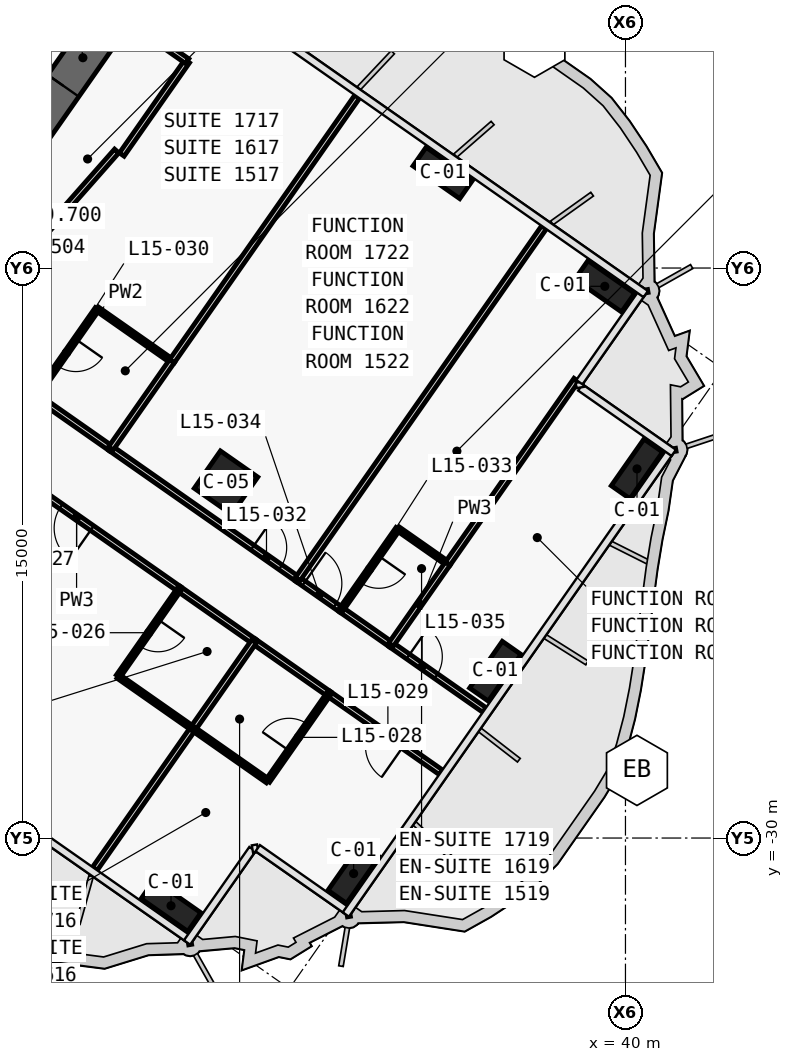
"""IFC4 building model, lengths in metres.
Left out: names, types, materials, properties, quantities, classifications, styles, units other than length and angle.
Written with IfcOpenShell. Run it as: python <this file> out.ifc"""

import sys

from ifc_helpers import new_model, si_unit, direction, frame, frame_2d, origin, origin_2d, place, context, subcontext, project, spatial, polyline, rectangle, outline, extrude, element, fill, save


model = new_model("IFC4")
c1 = context("Model", 3, precision=1e-05, world=origin(), true_north=direction((0.0, 1.0)))
c2 = subcontext(c1, "Body", "Model", "MODEL_VIEW")
j1 = project(units=[si_unit("LENGTHUNIT", "METRE"), si_unit("PLANEANGLEUNIT", "RADIAN")], contexts=[c1])
p1 = place(None, origin())
s1 = spatial("IfcSite", under=j1, at=p1, CompositionType="ELEMENT")
p2 = place(p1, origin())
s2 = spatial("IfcBuilding", under=s1, at=p2, CompositionType="ELEMENT")
p3 = place(p2, frame((0.0, 0.0, 79.7)))
s3 = spatial("IfcBuildingStorey", under=s2, at=p3, CompositionType="ELEMENT", Elevation=79.7)
p4 = place(p3, frame((21.708, -15.2, 0.0), z_axis=(0.0, 0.0, 1.0), x_axis=(0.573576324356, 0.819152122709, 0.0)))
e1 = element("IfcWall", 1, at=p4, inside=s3, PredefinedType="SHEAR", context=c2, shape_type="SweptSolid", body=[
    extrude(outline(polyline([(9.2, 0.5), (0.0, 0.5), (0.0, -0.5), (9.2, -0.5), (9.2, 0.5)])), origin(), (0.0, 0.0, 1.0), 3.6),
])
p5 = place(p4, frame((6.1, 0.0, 0.0)))
e2 = element("IfcOpeningElement", 2, at=p5, cuts=e1, PredefinedType="OPENING", context=c2, shape_type="SweptSolid", body=[
    extrude(rectangle(XDim=1.8, YDim=2.1, at=frame_2d((0.9, 1.05))), frame((0.0, 0.51, 0.0), z_axis=(0.0, -1.0, 0.0), x_axis=(1.0, 0.0, 0.0)), (0.0, 0.0, 1.0), 1.02),
])
p6 = place(p4, frame((1.9, 0.0, 0.0)))
e3 = element("IfcOpeningElement", 3, at=p6, cuts=e1, PredefinedType="OPENING", context=c2, shape_type="SweptSolid", body=[
    extrude(rectangle(XDim=1.8, YDim=2.1, at=frame_2d((0.9, 1.05))), frame((0.0, 0.51, 0.0), z_axis=(0.0, -1.0, 0.0), x_axis=(1.0, 0.0, 0.0)), (0.0, 0.0, 1.0), 1.02),
])
for number, where, z_axis, x_axis in (
    (4, (28.042, -31.782, 0.0), (0.0, 0.0, 1.0), (0.819, -0.574, 0.0)),
    (5, (35.197, -12.498, 0.0), (0.0, 0.0, 1.0), (0.819, -0.574, 0.0)),
    (6, (39.456, -15.481, 0.0), (0.0, 0.0, 1.0), (0.819, -0.574, 0.0)),
    (7, (32.847, -30.935, 0.0), (0.0, 0.0, 1.0), (0.574, 0.819, 0.0)),
    (8, (36.575, -25.61, 0.0), (0.0, 0.0, 1.0), (0.574, 0.819, 0.0)),
    (9, (40.303, -20.286, 0.0), (0.0, 0.0, 1.0), (0.574, 0.819, 0.0)),
):
    element("IfcColumn", number, at=place(p3, frame(where, z_axis=z_axis, x_axis=x_axis)), inside=s3, PredefinedType="COLUMN", context=c2, shape_type="SweptSolid", body=[
        extrude(rectangle(XDim=1.5, YDim=0.6, at=origin_2d()), origin(), (0.0, 0.0, 1.0), 3.6),
    ])
p7 = place(p3, frame((29.49, -20.649, 0.0), z_axis=(0.0, 0.0, 1.0), x_axis=(0.819152044289, -0.573576436351, 0.0)))
e10 = element("IfcColumn", 10, at=p7, inside=s3, PredefinedType="COLUMN", context=c2, shape_type="SweptSolid", body=[
    extrude(rectangle(XDim=1.2, YDim=1.2, at=origin_2d()), origin(), (0.0, 0.0, 1.0), 3.6),
])
p8 = place(p3, frame((24.491, -18.369, 0.0), z_axis=(0.0, 0.0, 1.0), x_axis=(0.819179439794, -0.573537309527, 0.0)))
e11 = element("IfcWall", 11, at=p8, inside=s3, PredefinedType="PARTITIONING", context=c2, shape_type="SweptSolid", body=[
    extrude(rectangle(XDim=2.404, YDim=0.15, at=frame_2d((1.202, 0.0))), origin(), (0.0, 0.0, 1.0), 3.32),
])
p9 = place(p3, frame((26.457, -19.746, 0.0), z_axis=(0.0, 0.0, 1.0), x_axis=(0.819165052243, -0.573557858619, 0.0)))
e12 = element("IfcWall", 12, at=p9, inside=s3, PredefinedType="PARTITIONING", context=c2, shape_type="SweptSolid", body=[
    extrude(rectangle(XDim=6.004, YDim=0.15, at=frame_2d((3.002, 0.0))), origin(), (0.0, 0.0, 1.0), 2.6),
])
p10 = place(p9, frame((4.552, 0.0, 0.0)))
e13 = element("IfcOpeningElement", 13, at=p10, cuts=e12, PredefinedType="OPENING", context=c2, shape_type="SweptSolid", body=[
    extrude(rectangle(XDim=0.9, YDim=2.1, at=frame_2d((0.45, 1.05))), frame((0.0, 0.085, 0.0), z_axis=(0.0, -1.0, 0.0), x_axis=(1.0, 0.0, 0.0)), (0.0, 0.0, 1.0), 0.17),
])
p11 = place(p3, frame((31.372, -23.188, 0.0), z_axis=(0.0, 0.0, 1.0), x_axis=(0.819199220913, -0.573509055252, 0.0)))
e14 = element("IfcWall", 14, at=p11, inside=s3, PredefinedType="PARTITIONING", context=c2, shape_type="SweptSolid", body=[
    extrude(rectangle(XDim=1.403, YDim=0.15, at=frame_2d((0.702, 0.0))), origin(), (0.0, 0.0, 1.0), 3.32),
])
p12 = place(p11, frame((0.202, 0.0, 0.0)))
e15 = element("IfcOpeningElement", 15, at=p12, cuts=e14, PredefinedType="OPENING", context=c2, shape_type="SweptSolid", body=[
    extrude(rectangle(XDim=1.0, YDim=2.1, at=frame_2d((0.5, 1.05))), frame((0.0, 0.085, 0.0), z_axis=(0.0, -1.0, 0.0), x_axis=(1.0, 0.0, 0.0)), (0.0, 0.0, 1.0), 0.17),
])
p13 = place(p3, frame((32.519, -23.99, 0.0), z_axis=(0.0, 0.0, 1.0), x_axis=(0.819189013667, -0.573523634986, 0.0)))
e16 = element("IfcWall", 16, at=p13, inside=s3, PredefinedType="PARTITIONING", context=c2, shape_type="SweptSolid", body=[
    extrude(rectangle(XDim=1.604, YDim=0.15, at=frame_2d((0.802, 0.0))), origin(), (0.0, 0.0, 1.0), 3.32),
])
p14 = place(p3, frame((33.829, -24.908, 0.0), z_axis=(0.0, 0.0, 1.0), x_axis=(0.81915932427, -0.57356603932, 0.0)))
e17 = element("IfcWall", 17, at=p14, inside=s3, PredefinedType="PARTITIONING", context=c2, shape_type="SweptSolid", body=[
    extrude(rectangle(XDim=3.002, YDim=0.15, at=frame_2d((1.501, 0.0))), origin(), (0.0, 0.0, 1.0), 2.5),
])
p15 = place(p14, frame((0.551, 0.0, 0.0)))
e18 = element("IfcOpeningElement", 18, at=p15, cuts=e17, PredefinedType="OPENING", context=c2, shape_type="SweptSolid", body=[
    extrude(rectangle(XDim=0.9, YDim=2.1, at=frame_2d((0.45, 1.05))), frame((0.0, 0.085, 0.0), z_axis=(0.0, -1.0, 0.0), x_axis=(1.0, 0.0, 0.0)), (0.0, 0.0, 1.0), 0.17),
])
p16 = place(p3, frame((28.261, -23.451, 0.0), z_axis=(0.0, 0.0, 1.0), x_axis=(-0.819141582452, 0.573591377113, 0.0)))
e19 = element("IfcWall", 19, at=p16, inside=s3, PredefinedType="PARTITIONING", context=c2, shape_type="SweptSolid", body=[
    extrude(rectangle(XDim=6.603, YDim=0.15, at=frame_2d((3.301, 0.0))), origin(), (0.0, 0.0, 1.0), 2.6),
])
p17 = place(p16, frame((2.801, 0.0, 0.0)))
e20 = element("IfcOpeningElement", 20, at=p17, cuts=e19, PredefinedType="OPENING", context=c2, shape_type="SweptSolid", body=[
    extrude(rectangle(XDim=1.0, YDim=2.1, at=frame_2d((0.5, 1.05))), frame((0.0, 0.085, 0.0), z_axis=(0.0, -1.0, 0.0), x_axis=(1.0, 0.0, 0.0)), (0.0, 0.0, 1.0), 0.17),
])
p18 = place(p3, frame((30.228, -24.828, 0.0), z_axis=(0.0, 0.0, 1.0), x_axis=(-0.819146032251, 0.573585022335, 0.0)))
e21 = element("IfcWall", 21, at=p18, inside=s3, PredefinedType="PARTITIONING", context=c2, shape_type="SweptSolid", body=[
    extrude(rectangle(XDim=2.404, YDim=0.15, at=frame_2d((1.202, 0.0))), origin(), (0.0, 0.0, 1.0), 3.32),
])
p19 = place(p3, frame((35.141, -28.268, 0.0), z_axis=(0.0, 0.0, 1.0), x_axis=(-0.819149096931, 0.573580645591, 0.0)))
e22 = element("IfcWall", 22, at=p19, inside=s3, PredefinedType="PARTITIONING", context=c2, shape_type="SweptSolid", body=[
    extrude(rectangle(XDim=3.601, YDim=0.15, at=frame_2d((1.8, 0.0))), origin(), (0.0, 0.0, 1.0), 2.5),
])
p20 = place(p19, frame((1.2, 0.0, 0.0)))
e23 = element("IfcOpeningElement", 23, at=p20, cuts=e22, PredefinedType="OPENING", context=c2, shape_type="SweptSolid", body=[
    extrude(rectangle(XDim=1.0, YDim=2.1, at=frame_2d((0.5, 1.05))), frame((0.0, 0.085, 0.0), z_axis=(0.0, -1.0, 0.0), x_axis=(1.0, 0.0, 0.0)), (0.0, 0.0, 1.0), 0.17),
])
p21 = place(p3, frame((32.194, -26.205, 0.0), z_axis=(0.0, 0.0, 1.0), x_axis=(-0.819146032251, 0.573585022335, 0.0)))
e24 = element("IfcWall", 24, at=p21, inside=s3, PredefinedType="PARTITIONING", context=c2, shape_type="SweptSolid", body=[
    extrude(rectangle(XDim=2.404, YDim=0.15, at=frame_2d((1.202, 0.0))), origin(), (0.0, 0.0, 1.0), 3.32),
])
p22 = place(p3, frame((26.098, -16.076, 0.0), z_axis=(0.0, 0.0, 1.0), x_axis=(-0.573550118428, -0.819170471667, 0.0)))
e25 = element("IfcWall", 25, at=p22, inside=s3, PredefinedType="PARTITIONING", context=c2, shape_type="SweptSolid", body=[
    extrude(rectangle(XDim=2.8, YDim=0.12, at=frame_2d((1.4, 0.0))), origin(), (0.0, 0.0, 1.0), 2.6),
])
p23 = place(p22, frame((0.975, 0.0, 0.0)))
e26 = element("IfcOpeningElement", 26, at=p23, cuts=e25, PredefinedType="OPENING", context=c2, shape_type="SweptSolid", body=[
    extrude(rectangle(XDim=0.85, YDim=2.05, at=frame_2d((0.425, 1.025))), frame((0.0, 0.07, 0.0), z_axis=(0.0, -1.0, 0.0), x_axis=(1.0, 0.0, 0.0)), (0.0, 0.0, 1.0), 0.14),
])
p24 = place(p3, frame((28.065, -17.453, 0.0), z_axis=(0.0, 0.0, 1.0), x_axis=(-0.819155442668, 0.573571582932, 0.0)))
e27 = element("IfcWall", 27, at=p24, inside=s3, PredefinedType="PARTITIONING", context=c2, shape_type="SweptSolid", body=[
    extrude(rectangle(XDim=2.4, YDim=0.12, at=frame_2d((1.2, 0.0))), origin(), (0.0, 0.0, 1.0), 3.32),
])
p25 = place(p3, frame((32.94, -10.491, 0.0), z_axis=(0.0, 0.0, 1.0), x_axis=(-0.573593433868, -0.819140142237, 0.0)))
e28 = element("IfcWall", 28, at=p25, inside=s3, PredefinedType="PARTITIONING", context=c2, shape_type="SweptSolid", body=[
    extrude(rectangle(XDim=8.499, YDim=0.15, at=frame_2d((4.25, 0.0))), origin(), (0.0, 0.0, 1.0), 2.6),
])
p26 = place(p3, frame((22.285, -16.825, 0.0), z_axis=(0.0, 0.0, 1.0), x_axis=(0.661551268245, 0.749899939647, 0.0)))
e29 = element("IfcWall", 29, at=p26, inside=s3, PredefinedType="PARTITIONING", context=c2, shape_type="SweptSolid", body=[
    extrude(rectangle(XDim=6.541, YDim=0.15, at=frame_2d((3.271, 0.0))), origin(), (0.0, 0.0, 1.0), 2.6),
])
p27 = place(p3, frame((26.746, -12.014, 0.0), z_axis=(0.0, 0.0, 1.0), x_axis=(0.573560650686, 0.819163097304, 0.0)))
e30 = element("IfcWall", 30, at=p27, inside=s3, PredefinedType="PARTITIONING", context=c2, shape_type="SweptSolid", body=[
    extrude(rectangle(XDim=3.0, YDim=0.15, at=frame_2d((1.5, 0.0))), origin(), (0.0, 0.0, 1.0), 3.32),
])
p28 = place(p3, frame((28.467, -9.556, 0.0), z_axis=(0.0, 0.0, 1.0), x_axis=(-0.819109000826, 0.573637903879, 0.0)))
e31 = element("IfcWall", 31, at=p28, inside=s3, PredefinedType="PARTITIONING", context=c2, shape_type="SweptSolid", body=[
    extrude(rectangle(XDim=1.68, YDim=0.15, at=frame_2d((0.84, 0.0))), origin(), (0.0, 0.0, 1.0), 3.32),
])
p29 = place(p3, frame((28.064, -17.454, 0.0), z_axis=(0.0, 0.0, 1.0), x_axis=(-0.573550118428, -0.819170471667, 0.0)))
e32 = element("IfcWall", 32, at=p29, inside=s3, PredefinedType="PARTITIONING", context=c2, shape_type="SweptSolid", body=[
    extrude(rectangle(XDim=2.8, YDim=0.15, at=frame_2d((1.4, 0.0))), origin(), (0.0, 0.0, 1.0), 2.6),
])
p30 = place(p3, frame((37.855, -13.932, 0.0), z_axis=(0.0, 0.0, 1.0), x_axis=(-0.573571089604, -0.819155788095, 0.0)))
e33 = element("IfcWall", 33, at=p30, inside=s3, PredefinedType="PARTITIONING", context=c2, shape_type="SweptSolid", body=[
    extrude(rectangle(XDim=11.3, YDim=0.15, at=frame_2d((5.65, 0.0))), origin(), (0.0, 0.0, 1.0), 2.5),
])
p31 = place(p3, frame((35.323, -22.779, 0.0), z_axis=(0.0, 0.0, 1.0), x_axis=(-0.81918174131, 0.573534022273, 0.0)))
e34 = element("IfcWall", 34, at=p31, inside=s3, PredefinedType="PARTITIONING", context=c2, shape_type="SweptSolid", body=[
    extrude(rectangle(XDim=1.6, YDim=0.12, at=frame_2d((0.8, 0.0))), origin(), (0.0, 0.0, 1.0), 3.32),
])
p32 = place(p3, frame((34.01, -21.861, 0.0), z_axis=(0.0, 0.0, 1.0), x_axis=(-0.573537965655, -0.819178980414, 0.0)))
e35 = element("IfcWall", 35, at=p32, inside=s3, PredefinedType="PARTITIONING", context=c2, shape_type="SweptSolid", body=[
    extrude(rectangle(XDim=2.6, YDim=0.12, at=frame_2d((1.3, 0.0))), origin(), (0.0, 0.0, 1.0), 2.6),
])
p33 = place(p32, frame((0.875, 0.0, 0.0)))
e36 = element("IfcOpeningElement", 36, at=p33, cuts=e35, PredefinedType="OPENING", context=c2, shape_type="SweptSolid", body=[
    extrude(rectangle(XDim=0.85, YDim=2.05, at=frame_2d((0.425, 1.025))), frame((0.0, 0.07, 0.0), z_axis=(0.0, -1.0, 0.0), x_axis=(1.0, 0.0, 0.0)), (0.0, 0.0, 1.0), 0.14),
])
p34 = place(p3, frame((38.708, -17.945, 0.0), z_axis=(0.0, 0.0, 1.0), x_axis=(-0.573573403315, -0.819154168035, 0.0)))
e37 = element("IfcWall", 37, at=p34, inside=s3, PredefinedType="PARTITIONING", context=c2, shape_type="SweptSolid", body=[
    extrude(rectangle(XDim=5.901, YDim=0.15, at=frame_2d((2.951, 0.0))), origin(), (0.0, 0.0, 1.0), 3.32),
])
p35 = place(p3, frame((35.322, -22.78, 0.0), z_axis=(0.0, 0.0, 1.0), x_axis=(-0.573537965655, -0.819178980414, 0.0)))
e38 = element("IfcWall", 38, at=p35, inside=s3, PredefinedType="PARTITIONING", context=c2, shape_type="SweptSolid", body=[
    extrude(rectangle(XDim=2.6, YDim=0.15, at=frame_2d((1.3, 0.0))), origin(), (0.0, 0.0, 1.0), 2.6),
])
p36 = place(p3, frame((28.26, -23.45, 0.0), z_axis=(0.0, 0.0, 1.0), x_axis=(-0.573608623498, -0.819129505664, 0.0)))
e39 = element("IfcWall", 39, at=p36, inside=s3, PredefinedType="PARTITIONING", context=c2, shape_type="SweptSolid", body=[
    extrude(rectangle(XDim=2.8, YDim=0.12, at=frame_2d((1.4, 0.0))), origin(), (0.0, 0.0, 1.0), 3.32),
])
p37 = place(p36, frame((0.975, 0.0, 0.0)))
e40 = element("IfcOpeningElement", 40, at=p37, cuts=e39, PredefinedType="OPENING", context=c2, shape_type="SweptSolid", body=[
    extrude(rectangle(XDim=0.85, YDim=2.05, at=frame_2d((0.425, 1.025))), frame((0.0, 0.07, 0.0), z_axis=(0.0, -1.0, 0.0), x_axis=(1.0, 0.0, 0.0)), (0.0, 0.0, 1.0), 0.14),
])
p38 = place(p3, frame((26.654, -25.745, 0.0), z_axis=(0.0, 0.0, 1.0), x_axis=(0.819188907105, -0.573523787192, 0.0)))
e41 = element("IfcWall", 41, at=p38, inside=s3, PredefinedType="PARTITIONING", context=c2, shape_type="SweptSolid", body=[
    extrude(rectangle(XDim=2.4, YDim=0.12, at=frame_2d((1.2, 0.0))), origin(), (0.0, 0.0, 1.0), 3.32),
])
p39 = place(p3, frame((28.62, -27.121, 0.0), z_axis=(0.0, 0.0, 1.0), x_axis=(-0.573589807488, -0.819142681555, 0.0)))
e42 = element("IfcWall", 42, at=p39, inside=s3, PredefinedType="PARTITIONING", context=c2, shape_type="SweptSolid", body=[
    extrude(rectangle(XDim=4.499, YDim=0.15, at=frame_2d((2.25, 0.0))), origin(), (0.0, 0.0, 1.0), 2.5),
])
p40 = place(p3, frame((30.226, -24.827, 0.0), z_axis=(0.0, 0.0, 1.0), x_axis=(-0.573608623498, -0.819129505664, 0.0)))
e43 = element("IfcWall", 43, at=p40, inside=s3, PredefinedType="PARTITIONING", context=c2, shape_type="SweptSolid", body=[
    extrude(rectangle(XDim=2.8, YDim=0.15, at=frame_2d((1.4, 0.0))), origin(), (0.0, 0.0, 1.0), 3.32),
])
p41 = place(p3, frame((28.62, -27.121, 0.0), z_axis=(0.0, 0.0, 1.0), x_axis=(0.819141114317, -0.573592045652, 0.0)))
e44 = element("IfcWall", 44, at=p41, inside=s3, PredefinedType="PARTITIONING", context=c2, shape_type="SweptSolid", body=[
    extrude(rectangle(XDim=2.4, YDim=0.12, at=frame_2d((1.2, 0.0))), origin(), (0.0, 0.0, 1.0), 3.32),
])
p42 = place(p3, frame((30.587, -28.498, 0.0), z_axis=(0.0, 0.0, 1.0), x_axis=(0.573608623498, 0.819129505664, 0.0)))
e45 = element("IfcWall", 45, at=p42, inside=s3, PredefinedType="PARTITIONING", context=c2, shape_type="SweptSolid", body=[
    extrude(rectangle(XDim=2.8, YDim=0.12, at=frame_2d((1.4, 0.0))), origin(), (0.0, 0.0, 1.0), 3.32),
])
p43 = place(p42, frame((0.975, 0.0, 0.0)))
e46 = element("IfcOpeningElement", 46, at=p43, cuts=e45, PredefinedType="OPENING", context=c2, shape_type="SweptSolid", body=[
    extrude(rectangle(XDim=0.85, YDim=2.05, at=frame_2d((0.425, 1.025))), frame((0.0, 0.07, 0.0), z_axis=(0.0, -1.0, 0.0), x_axis=(1.0, 0.0, 0.0)), (0.0, 0.0, 1.0), 0.14),
])
p44 = place(p5, origin())
e47 = element("IfcDoor", 47, at=p44, inside=s3, OperationType="DOUBLE_DOOR_SINGLE_SWING", PredefinedType="DOOR", context=c2, shape_type="SweptSolid", body=[
    extrude(rectangle(XDim=1.8, YDim=2.1, at=frame_2d((0.9, 1.05))), frame((0.0, 0.025, 0.0), z_axis=(0.0, -1.0, 0.0), x_axis=(1.0, 0.0, 0.0)), (0.0, 0.0, 1.0), 0.05),
])
fill(e2, e47)
p45 = place(p37, origin())
e48 = element("IfcDoor", 48, at=p45, inside=s3, OperationType="SINGLE_SWING_RIGHT", PredefinedType="DOOR", context=c2, shape_type="SweptSolid", body=[
    extrude(rectangle(XDim=0.85, YDim=2.05, at=frame_2d((0.425, 1.025))), frame((0.0, 0.025, 0.0), z_axis=(0.0, -1.0, 0.0), x_axis=(1.0, 0.0, 0.0)), (0.0, 0.0, 1.0), 0.05),
])
fill(e40, e48)
p46 = place(p17, origin())
e49 = element("IfcDoor", 49, at=p46, inside=s3, OperationType="SINGLE_SWING_RIGHT", PredefinedType="DOOR", context=c2, shape_type="SweptSolid", body=[
    extrude(rectangle(XDim=1.0, YDim=2.1, at=frame_2d((0.5, 1.05))), frame((0.0, 0.025, 0.0), z_axis=(0.0, -1.0, 0.0), x_axis=(1.0, 0.0, 0.0)), (0.0, 0.0, 1.0), 0.05),
])
fill(e20, e49)
p47 = place(p43, origin())
e50 = element("IfcDoor", 50, at=p47, inside=s3, OperationType="SINGLE_SWING_RIGHT", PredefinedType="DOOR", context=c2, shape_type="SweptSolid", body=[
    extrude(rectangle(XDim=0.85, YDim=2.05, at=frame_2d((0.425, 1.025))), frame((0.0, 0.025, 0.0), z_axis=(0.0, -1.0, 0.0), x_axis=(1.0, 0.0, 0.0)), (0.0, 0.0, 1.0), 0.05),
])
fill(e46, e50)
p48 = place(p20, origin())
e51 = element("IfcDoor", 51, at=p48, inside=s3, OperationType="SINGLE_SWING_RIGHT", PredefinedType="DOOR", context=c2, shape_type="SweptSolid", body=[
    extrude(rectangle(XDim=1.0, YDim=2.1, at=frame_2d((0.5, 1.05))), frame((0.0, 0.025, 0.0), z_axis=(0.0, -1.0, 0.0), x_axis=(1.0, 0.0, 0.0)), (0.0, 0.0, 1.0), 0.05),
])
fill(e23, e51)
p49 = place(p23, origin())
e52 = element("IfcDoor", 52, at=p49, inside=s3, OperationType="SINGLE_SWING_RIGHT", PredefinedType="DOOR", context=c2, shape_type="SweptSolid", body=[
    extrude(rectangle(XDim=0.85, YDim=2.05, at=frame_2d((0.425, 1.025))), frame((0.0, 0.025, 0.0), z_axis=(0.0, -1.0, 0.0), x_axis=(1.0, 0.0, 0.0)), (0.0, 0.0, 1.0), 0.05),
])
fill(e26, e52)
p50 = place(p10, origin())
e53 = element("IfcDoor", 53, at=p50, inside=s3, OperationType="SINGLE_SWING_RIGHT", PredefinedType="DOOR", context=c2, shape_type="SweptSolid", body=[
    extrude(rectangle(XDim=0.9, YDim=2.1, at=frame_2d((0.45, 1.05))), frame((0.0, 0.025, 0.0), z_axis=(0.0, -1.0, 0.0), x_axis=(1.0, 0.0, 0.0)), (0.0, 0.0, 1.0), 0.05),
])
fill(e13, e53)
p51 = place(p33, origin())
e54 = element("IfcDoor", 54, at=p51, inside=s3, OperationType="SINGLE_SWING_RIGHT", PredefinedType="DOOR", context=c2, shape_type="SweptSolid", body=[
    extrude(rectangle(XDim=0.85, YDim=2.05, at=frame_2d((0.425, 1.025))), frame((0.0, 0.025, 0.0), z_axis=(0.0, -1.0, 0.0), x_axis=(1.0, 0.0, 0.0)), (0.0, 0.0, 1.0), 0.05),
])
fill(e36, e54)
p52 = place(p12, origin())
e55 = element("IfcDoor", 55, at=p52, inside=s3, OperationType="SINGLE_SWING_LEFT", PredefinedType="DOOR", context=c2, shape_type="SweptSolid", body=[
    extrude(rectangle(XDim=1.0, YDim=2.1, at=frame_2d((0.5, 1.05))), frame((0.0, 0.025, 0.0), z_axis=(0.0, -1.0, 0.0), x_axis=(1.0, 0.0, 0.0)), (0.0, 0.0, 1.0), 0.05),
])
fill(e15, e55)
p53 = place(p15, origin())
e56 = element("IfcDoor", 56, at=p53, inside=s3, OperationType="SINGLE_SWING_LEFT", PredefinedType="DOOR", context=c2, shape_type="SweptSolid", body=[
    extrude(rectangle(XDim=0.9, YDim=2.1, at=frame_2d((0.45, 1.05))), frame((0.0, 0.025, 0.0), z_axis=(0.0, -1.0, 0.0), x_axis=(1.0, 0.0, 0.0)), (0.0, 0.0, 1.0), 0.05),
])
fill(e18, e56)
save(model, sys.argv[1])
